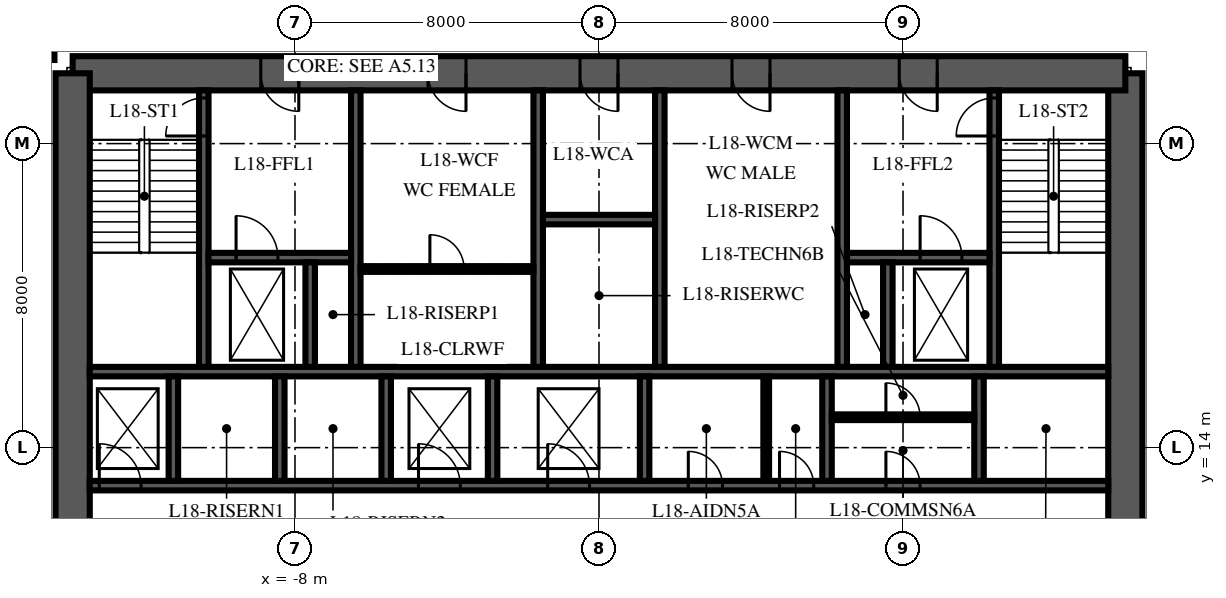
"""IFC4 building model, lengths in metres.
Left out: names, types, materials, properties, quantities, classifications, styles, units other than length and angle.
Written with IfcOpenShell. Run it as: python <this file> out.ifc"""

import sys

from ifc_helpers import new_model, si_unit, direction, frame, frame_2d, origin, place, context, subcontext, project, spatial, polyline, rectangle, outline, extrude, element, fill, save


model = new_model("IFC4")
c1 = context("Model", 3, precision=1e-05, world=origin(), true_north=direction((0.0, 1.0)))
c2 = subcontext(c1, "Body", "Model", "MODEL_VIEW")
j1 = project(units=[si_unit("LENGTHUNIT", "METRE"), si_unit("PLANEANGLEUNIT", "RADIAN")], contexts=[c1])
p1 = place(None, origin())
s1 = spatial("IfcSite", under=j1, at=p1, CompositionType="ELEMENT")
p2 = place(p1, origin())
s2 = spatial("IfcBuilding", under=s1, at=p2, CompositionType="ELEMENT")
p3 = place(p2, frame((0.0, 0.0, 84.0)))
s3 = spatial("IfcBuildingStorey", under=s2, at=p3, CompositionType="ELEMENT", Elevation=84.0)
p4 = place(p3, frame((13.85, 6.15, 0.0), z_axis=(0.0, 0.0, 1.0), x_axis=(0.0, 1.0, 0.0)))
e1 = element("IfcWall", 1, at=p4, inside=s3, PredefinedType="SHEAR", context=c2, shape_type="SweptSolid", body=[
    extrude(outline(polyline([(0.0, -0.45), (17.7, -0.45), (17.7, 0.0), (17.25, 0.0), (17.25, 0.45), (0.45, 0.45), (0.45, 0.0), (0.0, 0.0), (0.0, -0.45)])), origin(), (0.0, 0.0, 1.0), 4.0),
])
p5 = place(p4, frame((4.15, 0.0, 0.0)))
e2 = element("IfcOpeningElement", 2, at=p5, cuts=e1, PredefinedType="OPENING", context=c2, shape_type="SweptSolid", body=[
    extrude(rectangle(XDim=1.8, YDim=2.4, at=frame_2d((0.9, 1.2))), frame((0.0, 0.465, 0.0), z_axis=(0.0, -1.0, 0.0), x_axis=(1.0, 0.0, 0.0)), (0.0, 0.0, 1.0), 0.93),
])
p6 = place(p3, frame((13.85, 23.85, 0.0), z_axis=(0.0, 0.0, 1.0), x_axis=(-1.0, 0.0, 0.0)))
e3 = element("IfcWall", 3, at=p6, inside=s3, PredefinedType="SHEAR", context=c2, shape_type="SweptSolid", body=[
    extrude(rectangle(XDim=27.7, YDim=0.9, at=frame_2d((13.85, 0.0))), origin(), (0.0, 0.0, 1.0), 4.0),
])
p7 = place(p6, frame((21.75, 0.0, 0.0)))
e4 = element("IfcOpeningElement", 4, at=p7, cuts=e3, PredefinedType="OPENING", context=c2, shape_type="SweptSolid", body=[
    extrude(rectangle(XDim=1.0, YDim=2.1, at=frame_2d((0.5, 1.05))), frame((0.0, 0.465, 0.0), z_axis=(0.0, -1.0, 0.0), x_axis=(1.0, 0.0, 0.0)), (0.0, 0.0, 1.0), 0.93),
])
p8 = place(p6, frame((4.95, 0.0, 0.0)))
e5 = element("IfcOpeningElement", 5, at=p8, cuts=e3, PredefinedType="OPENING", context=c2, shape_type="SweptSolid", body=[
    extrude(rectangle(XDim=1.0, YDim=2.1, at=frame_2d((0.5, 1.05))), frame((0.0, 0.465, 0.0), z_axis=(0.0, -1.0, 0.0), x_axis=(1.0, 0.0, 0.0)), (0.0, 0.0, 1.0), 0.93),
])
p9 = place(p6, frame((17.35, 0.0, 0.0)))
e6 = element("IfcOpeningElement", 6, at=p9, cuts=e3, PredefinedType="OPENING", context=c2, shape_type="SweptSolid", body=[
    extrude(rectangle(XDim=1.0, YDim=2.1, at=frame_2d((0.5, 1.05))), frame((0.0, 0.465, 0.0), z_axis=(0.0, -1.0, 0.0), x_axis=(1.0, 0.0, 0.0)), (0.0, 0.0, 1.0), 0.93),
])
p10 = place(p6, frame((13.35, 0.0, 0.0)))
e7 = element("IfcOpeningElement", 7, at=p10, cuts=e3, PredefinedType="OPENING", context=c2, shape_type="SweptSolid", body=[
    extrude(rectangle(XDim=1.0, YDim=2.1, at=frame_2d((0.5, 1.05))), frame((0.0, 0.465, 0.0), z_axis=(0.0, -1.0, 0.0), x_axis=(1.0, 0.0, 0.0)), (0.0, 0.0, 1.0), 0.93),
])
p11 = place(p6, frame((9.35, 0.0, 0.0)))
e8 = element("IfcOpeningElement", 8, at=p11, cuts=e3, PredefinedType="OPENING", context=c2, shape_type="SweptSolid", body=[
    extrude(rectangle(XDim=1.0, YDim=2.1, at=frame_2d((0.5, 1.05))), frame((0.0, 0.465, 0.0), z_axis=(0.0, -1.0, 0.0), x_axis=(1.0, 0.0, 0.0)), (0.0, 0.0, 1.0), 0.93),
])
p12 = place(p3, frame((-13.85, 23.85, 0.0), z_axis=(0.0, 0.0, 1.0), x_axis=(0.0, -1.0, 0.0)))
e9 = element("IfcWall", 9, at=p12, inside=s3, PredefinedType="SHEAR", context=c2, shape_type="SweptSolid", body=[
    extrude(outline(polyline([(0.0, -0.45), (17.7, -0.45), (17.7, 0.0), (17.25, 0.0), (17.25, 0.45), (0.45, 0.45), (0.45, 0.0), (0.0, 0.0), (0.0, -0.45)])), origin(), (0.0, 0.0, 1.0), 4.0),
])
p13 = place(p12, frame((11.75, 0.0, 0.0)))
e10 = element("IfcOpeningElement", 10, at=p13, cuts=e9, PredefinedType="OPENING", context=c2, shape_type="SweptSolid", body=[
    extrude(rectangle(XDim=1.8, YDim=2.4, at=frame_2d((0.9, 1.2))), frame((0.0, 0.465, 0.0), z_axis=(0.0, -1.0, 0.0), x_axis=(1.0, 0.0, 0.0)), (0.0, 0.0, 1.0), 0.93),
])
p14 = place(p3, frame((-13.4, 13.0, 0.0), z_axis=(0.0, 0.0, 1.0), x_axis=(1.0, 0.0, 0.0)))
e11 = element("IfcWall", 11, at=p14, inside=s3, PredefinedType="SHEAR", context=c2, shape_type="SweptSolid", body=[
    extrude(rectangle(XDim=26.8, YDim=0.25, at=frame_2d((13.4, 0.0))), origin(), (0.0, 0.0, 1.0), 4.0),
])
p15 = place(p14, frame((0.25, 0.0, 0.0)))
e12 = element("IfcOpeningElement", 12, at=p15, cuts=e11, PredefinedType="OPENING", context=c2, shape_type="SweptSolid", body=[
    extrude(rectangle(XDim=1.1, YDim=2.1, at=frame_2d((0.55, 1.05))), frame((0.0, 0.14, 0.0), z_axis=(0.0, -1.0, 0.0), x_axis=(1.0, 0.0, 0.0)), (0.0, 0.0, 1.0), 0.28),
])
p16 = place(p14, frame((8.65, 0.0, 0.0)))
e13 = element("IfcOpeningElement", 13, at=p16, cuts=e11, PredefinedType="OPENING", context=c2, shape_type="SweptSolid", body=[
    extrude(rectangle(XDim=1.1, YDim=2.1, at=frame_2d((0.55, 1.05))), frame((0.0, 0.14, 0.0), z_axis=(0.0, -1.0, 0.0), x_axis=(1.0, 0.0, 0.0)), (0.0, 0.0, 1.0), 0.28),
])
p17 = place(p14, frame((12.05, 0.0, 0.0)))
e14 = element("IfcOpeningElement", 14, at=p17, cuts=e11, PredefinedType="OPENING", context=c2, shape_type="SweptSolid", body=[
    extrude(rectangle(XDim=1.1, YDim=2.1, at=frame_2d((0.55, 1.05))), frame((0.0, 0.14, 0.0), z_axis=(0.0, -1.0, 0.0), x_axis=(1.0, 0.0, 0.0)), (0.0, 0.0, 1.0), 0.28),
])
p18 = place(p14, frame((15.75, 0.0, 0.0)))
e15 = element("IfcOpeningElement", 15, at=p18, cuts=e11, PredefinedType="OPENING", context=c2, shape_type="SweptSolid", body=[
    extrude(rectangle(XDim=0.9, YDim=2.1, at=frame_2d((0.45, 1.05))), frame((0.0, 0.14, 0.0), z_axis=(0.0, -1.0, 0.0), x_axis=(1.0, 0.0, 0.0)), (0.0, 0.0, 1.0), 0.28),
])
p19 = place(p14, frame((18.15, 0.0, 0.0)))
e16 = element("IfcOpeningElement", 16, at=p19, cuts=e11, PredefinedType="OPENING", context=c2, shape_type="SweptSolid", body=[
    extrude(rectangle(XDim=0.9, YDim=2.1, at=frame_2d((0.45, 1.05))), frame((0.0, 0.14, 0.0), z_axis=(0.0, -1.0, 0.0), x_axis=(1.0, 0.0, 0.0)), (0.0, 0.0, 1.0), 0.28),
])
p20 = place(p14, frame((20.95, 0.0, 0.0)))
e17 = element("IfcOpeningElement", 17, at=p20, cuts=e11, PredefinedType="OPENING", context=c2, shape_type="SweptSolid", body=[
    extrude(rectangle(XDim=0.9, YDim=2.1, at=frame_2d((0.45, 1.05))), frame((0.0, 0.14, 0.0), z_axis=(0.0, -1.0, 0.0), x_axis=(1.0, 0.0, 0.0)), (0.0, 0.0, 1.0), 0.28),
])
p21 = place(p3, frame((-13.4, 16.0, 0.0), z_axis=(0.0, 0.0, 1.0), x_axis=(1.0, 0.0, 0.0)))
e18 = element("IfcWall", 18, at=p21, inside=s3, PredefinedType="SHEAR", context=c2, shape_type="SweptSolid", body=[
    extrude(rectangle(XDim=26.8, YDim=0.25, at=frame_2d((13.4, 0.0))), origin(), (0.0, 0.0, 1.0), 4.0),
])
for number, where, z_axis, x_axis in (
    (19, (-11.2, 13.125, 0.0), (0.0, 0.0, 1.0), (0.0, 1.0, 0.0)),
    (20, (-8.4, 13.125, 0.0), (0.0, 0.0, 1.0), (0.0, 1.0, 0.0)),
    (21, (-5.6, 13.125, 0.0), (0.0, 0.0, 1.0), (0.0, 1.0, 0.0)),
    (22, (-2.8, 13.125, 0.0), (0.0, 0.0, 1.0), (0.0, 1.0, 0.0)),
    (23, (1.2, 13.125, 0.0), (0.0, 0.0, 1.0), (0.0, 1.0, 0.0)),
    (24, (6.0, 13.125, 0.0), (0.0, 0.0, 1.0), (0.0, 1.0, 0.0)),
    (25, (10.0, 13.125, 0.0), (0.0, 0.0, 1.0), (0.0, 1.0, 0.0)),
):
    element("IfcWall", number, at=place(p3, frame(where, z_axis=z_axis, x_axis=x_axis)), inside=s3, PredefinedType="SHEAR", context=c2, shape_type="SweptSolid", body=[
        extrude(rectangle(XDim=2.75, YDim=0.25, at=frame_2d((1.375, 0.0))), origin(), (0.0, 0.0, 1.0), 4.0),
    ])
p22 = place(p3, frame((-10.4, 16.125, 0.0), z_axis=(0.0, 0.0, 1.0), x_axis=(0.0, 1.0, 0.0)))
e26 = element("IfcWall", 26, at=p22, inside=s3, PredefinedType="SHEAR", context=c2, shape_type="SweptSolid", body=[
    extrude(rectangle(XDim=7.275, YDim=0.25, at=frame_2d((3.637, 0.0))), origin(), (0.0, 0.0, 1.0), 4.0),
])
p23 = place(p22, frame((6.075, 0.0, 0.0)))
e27 = element("IfcOpeningElement", 27, at=p23, cuts=e26, PredefinedType="OPENING", context=c2, shape_type="SweptSolid", body=[
    extrude(rectangle(XDim=1.0, YDim=2.1, at=frame_2d((0.5, 1.05))), frame((0.0, 0.14, 0.0), z_axis=(0.0, -1.0, 0.0), x_axis=(1.0, 0.0, 0.0)), (0.0, 0.0, 1.0), 0.28),
])
for number, where, z_axis, x_axis in (
    (28, (-6.4, 16.125, 0.0), (0.0, 0.0, 1.0), (0.0, 1.0, 0.0)),
    (29, (-1.6, 16.125, 0.0), (0.0, 0.0, 1.0), (0.0, 1.0, 0.0)),
    (30, (1.6, 16.125, 0.0), (0.0, 0.0, 1.0), (0.0, 1.0, 0.0)),
    (31, (6.4, 16.125, 0.0), (0.0, 0.0, 1.0), (0.0, 1.0, 0.0)),
):
    element("IfcWall", number, at=place(p3, frame(where, z_axis=z_axis, x_axis=x_axis)), inside=s3, PredefinedType="SHEAR", context=c2, shape_type="SweptSolid", body=[
        extrude(rectangle(XDim=7.275, YDim=0.25, at=frame_2d((3.637, 0.0))), origin(), (0.0, 0.0, 1.0), 4.0),
    ])
p24 = place(p3, frame((10.4, 16.125, 0.0), z_axis=(0.0, 0.0, 1.0), x_axis=(0.0, 1.0, 0.0)))
e32 = element("IfcWall", 32, at=p24, inside=s3, PredefinedType="SHEAR", context=c2, shape_type="SweptSolid", body=[
    extrude(rectangle(XDim=7.275, YDim=0.25, at=frame_2d((3.637, 0.0))), origin(), (0.0, 0.0, 1.0), 4.0),
])
p25 = place(p24, frame((6.075, 0.0, 0.0)))
e33 = element("IfcOpeningElement", 33, at=p25, cuts=e32, PredefinedType="OPENING", context=c2, shape_type="SweptSolid", body=[
    extrude(rectangle(XDim=1.0, YDim=2.1, at=frame_2d((0.5, 1.05))), frame((0.0, 0.14, 0.0), z_axis=(0.0, -1.0, 0.0), x_axis=(1.0, 0.0, 0.0)), (0.0, 0.0, 1.0), 0.28),
])
p26 = place(p3, frame((-10.275, 19.0, 0.0), z_axis=(0.0, 0.0, 1.0), x_axis=(1.0, 0.0, 0.0)))
e34 = element("IfcWall", 34, at=p26, inside=s3, PredefinedType="SHEAR", context=c2, shape_type="SweptSolid", body=[
    extrude(rectangle(XDim=3.75, YDim=0.25, at=frame_2d((1.875, 0.0))), origin(), (0.0, 0.0, 1.0), 4.0),
])
p27 = place(p26, frame((0.725, 0.0, 0.0)))
e35 = element("IfcOpeningElement", 35, at=p27, cuts=e34, PredefinedType="OPENING", context=c2, shape_type="SweptSolid", body=[
    extrude(rectangle(XDim=1.1, YDim=2.1, at=frame_2d((0.55, 1.05))), frame((0.0, 0.14, 0.0), z_axis=(0.0, -1.0, 0.0), x_axis=(1.0, 0.0, 0.0)), (0.0, 0.0, 1.0), 0.28),
])
p28 = place(p3, frame((6.525, 19.0, 0.0), z_axis=(0.0, 0.0, 1.0), x_axis=(1.0, 0.0, 0.0)))
e36 = element("IfcWall", 36, at=p28, inside=s3, PredefinedType="SHEAR", context=c2, shape_type="SweptSolid", body=[
    extrude(rectangle(XDim=3.75, YDim=0.25, at=frame_2d((1.875, 0.0))), origin(), (0.0, 0.0, 1.0), 4.0),
])
p29 = place(p28, frame((1.925, 0.0, 0.0)))
e37 = element("IfcOpeningElement", 37, at=p29, cuts=e36, PredefinedType="OPENING", context=c2, shape_type="SweptSolid", body=[
    extrude(rectangle(XDim=1.1, YDim=2.1, at=frame_2d((0.55, 1.05))), frame((0.0, 0.14, 0.0), z_axis=(0.0, -1.0, 0.0), x_axis=(1.0, 0.0, 0.0)), (0.0, 0.0, 1.0), 0.28),
])
for number, where, z_axis, x_axis in (
    (38, (-7.6, 16.125, 0.0), (0.0, 0.0, 1.0), (0.0, 1.0, 0.0)),
    (39, (7.6, 16.125, 0.0), (0.0, 0.0, 1.0), (0.0, 1.0, 0.0)),
):
    element("IfcWall", number, at=place(p3, frame(where, z_axis=z_axis, x_axis=x_axis)), inside=s3, PredefinedType="SHEAR", context=c2, shape_type="SweptSolid", body=[
        extrude(rectangle(XDim=2.75, YDim=0.25, at=frame_2d((1.375, 0.0))), origin(), (0.0, 0.0, 1.0), 4.0),
    ])
p30 = place(p3, frame((-1.475, 20.0, 0.0), z_axis=(0.0, 0.0, 1.0), x_axis=(1.0, 0.0, 0.0)))
e40 = element("IfcWall", 40, at=p30, inside=s3, PredefinedType="SHEAR", context=c2, shape_type="SweptSolid", body=[
    extrude(rectangle(XDim=2.95, YDim=0.25, at=frame_2d((1.475, 0.0))), origin(), (0.0, 0.0, 1.0), 4.0),
])
p31 = place(p3, frame((-6.275, 18.7, 0.0), z_axis=(0.0, 0.0, 1.0), x_axis=(1.0, 0.0, 0.0)))
e41 = element("IfcWall", 41, at=p31, inside=s3, PredefinedType="PARTITIONING", context=c2, shape_type="SweptSolid", body=[
    extrude(rectangle(XDim=4.55, YDim=0.15, at=frame_2d((2.275, 0.0))), origin(), (0.0, 0.0, 1.0), 3.85),
])
p32 = place(p31, frame((1.825, 0.0, 0.0)))
e42 = element("IfcOpeningElement", 42, at=p32, cuts=e41, PredefinedType="OPENING", context=c2, shape_type="SweptSolid", body=[
    extrude(rectangle(XDim=0.9, YDim=2.1, at=frame_2d((0.45, 1.05))), frame((0.0, 0.09, 0.0), z_axis=(0.0, -1.0, 0.0), x_axis=(1.0, 0.0, 0.0)), (0.0, 0.0, 1.0), 0.18),
])
p33 = place(p3, frame((4.4, 13.125, 0.0), z_axis=(0.0, 0.0, 1.0), x_axis=(0.0, 1.0, 0.0)))
e43 = element("IfcWall", 43, at=p33, inside=s3, PredefinedType="PARTITIONING", context=c2, shape_type="SweptSolid", body=[
    extrude(rectangle(XDim=2.75, YDim=0.15, at=frame_2d((1.375, 0.0))), origin(), (0.0, 0.0, 1.0), 3.85),
])
p34 = place(p3, frame((6.125, 14.8, 0.0), z_axis=(0.0, 0.0, 1.0), x_axis=(1.0, 0.0, 0.0)))
e44 = element("IfcWall", 44, at=p34, inside=s3, PredefinedType="PARTITIONING", context=c2, shape_type="SweptSolid", body=[
    extrude(rectangle(XDim=3.75, YDim=0.15, at=frame_2d((1.875, 0.0))), origin(), (0.0, 0.0, 1.0), 3.85),
])
p35 = place(p34, frame((1.425, 0.0, 0.0)))
e45 = element("IfcOpeningElement", 45, at=p35, cuts=e44, PredefinedType="OPENING", context=c2, shape_type="SweptSolid", body=[
    extrude(rectangle(XDim=0.9, YDim=2.1, at=frame_2d((0.45, 1.05))), frame((0.0, 0.09, 0.0), z_axis=(0.0, -1.0, 0.0), x_axis=(1.0, 0.0, 0.0)), (0.0, 0.0, 1.0), 0.18),
])
p36 = place(p3, frame((-16.1, 24.3, 0.0), z_axis=(0.0, 0.0, 1.0), x_axis=(1.0, 0.0, 0.0)))
e46 = element("IfcWall", 46, at=p36, inside=s3, PredefinedType="PARTITIONING", context=c2, shape_type="SweptSolid", body=[
    extrude(rectangle(XDim=1.77, YDim=0.2, at=frame_2d((0.885, 0.0))), origin(), (0.0, 0.0, 1.0), 3.4),
])
p37 = place(p7, origin())
e47 = element("IfcDoor", 47, at=p37, inside=s3, OperationType="SINGLE_SWING_RIGHT", PredefinedType="DOOR", context=c2, shape_type="SweptSolid", body=[
    extrude(rectangle(XDim=1.0, YDim=2.1, at=frame_2d((0.5, 1.05))), frame((0.0, 0.45, 0.0), z_axis=(0.0, -1.0, 0.0), x_axis=(1.0, 0.0, 0.0)), (0.0, 0.0, 1.0), 0.899),
])
fill(e4, e47)
p38 = place(p8, origin())
e48 = element("IfcDoor", 48, at=p38, inside=s3, OperationType="SINGLE_SWING_RIGHT", PredefinedType="DOOR", context=c2, shape_type="SweptSolid", body=[
    extrude(rectangle(XDim=1.0, YDim=2.1, at=frame_2d((0.5, 1.05))), frame((0.0, 0.45, 0.0), z_axis=(0.0, -1.0, 0.0), x_axis=(1.0, 0.0, 0.0)), (0.0, 0.0, 1.0), 0.899),
])
fill(e5, e48)
p39 = place(p9, origin())
e49 = element("IfcDoor", 49, at=p39, inside=s3, OperationType="SINGLE_SWING_LEFT", PredefinedType="DOOR", context=c2, shape_type="SweptSolid", body=[
    extrude(rectangle(XDim=1.0, YDim=2.1, at=frame_2d((0.5, 1.05))), frame((0.0, 0.45, 0.0), z_axis=(0.0, -1.0, 0.0), x_axis=(1.0, 0.0, 0.0)), (0.0, 0.0, 1.0), 0.899),
])
fill(e6, e49)
p40 = place(p10, origin())
e50 = element("IfcDoor", 50, at=p40, inside=s3, OperationType="SINGLE_SWING_LEFT", PredefinedType="DOOR", context=c2, shape_type="SweptSolid", body=[
    extrude(rectangle(XDim=1.0, YDim=2.1, at=frame_2d((0.5, 1.05))), frame((0.0, 0.45, 0.0), z_axis=(0.0, -1.0, 0.0), x_axis=(1.0, 0.0, 0.0)), (0.0, 0.0, 1.0), 0.899),
])
fill(e7, e50)
p41 = place(p11, origin())
e51 = element("IfcDoor", 51, at=p41, inside=s3, OperationType="SINGLE_SWING_LEFT", PredefinedType="DOOR", context=c2, shape_type="SweptSolid", body=[
    extrude(rectangle(XDim=1.0, YDim=2.1, at=frame_2d((0.5, 1.05))), frame((0.0, 0.45, 0.0), z_axis=(0.0, -1.0, 0.0), x_axis=(1.0, 0.0, 0.0)), (0.0, 0.0, 1.0), 0.899),
])
fill(e8, e51)
p42 = place(p23, origin())
e52 = element("IfcDoor", 52, at=p42, inside=s3, OperationType="SINGLE_SWING_LEFT", PredefinedType="DOOR", context=c2, shape_type="SweptSolid", body=[
    extrude(rectangle(XDim=1.0, YDim=2.1, at=frame_2d((0.5, 1.05))), frame((0.0, 0.125, 0.0), z_axis=(0.0, -1.0, 0.0), x_axis=(1.0, 0.0, 0.0)), (0.0, 0.0, 1.0), 0.25),
])
fill(e27, e52)
p43 = place(p25, origin())
e53 = element("IfcDoor", 53, at=p43, inside=s3, OperationType="SINGLE_SWING_LEFT", PredefinedType="DOOR", context=c2, shape_type="SweptSolid", body=[
    extrude(rectangle(XDim=1.0, YDim=2.1, at=frame_2d((0.5, 1.05))), frame((0.0, 0.125, 0.0), z_axis=(0.0, -1.0, 0.0), x_axis=(1.0, 0.0, 0.0)), (0.0, 0.0, 1.0), 0.25),
])
fill(e33, e53)
p44 = place(p15, origin())
e54 = element("IfcDoor", 54, at=p44, inside=s3, OperationType="SLIDING_TO_LEFT", PredefinedType="DOOR", context=c2, shape_type="SweptSolid", body=[
    extrude(rectangle(XDim=1.1, YDim=2.1, at=frame_2d((0.55, 1.05))), frame((0.0, 0.125, 0.0), z_axis=(0.0, -1.0, 0.0), x_axis=(1.0, 0.0, 0.0)), (0.0, 0.0, 1.0), 0.25),
])
fill(e12, e54)
p45 = place(p16, origin())
e55 = element("IfcDoor", 55, at=p45, inside=s3, OperationType="SLIDING_TO_LEFT", PredefinedType="DOOR", context=c2, shape_type="SweptSolid", body=[
    extrude(rectangle(XDim=1.1, YDim=2.1, at=frame_2d((0.55, 1.05))), frame((0.0, 0.125, 0.0), z_axis=(0.0, -1.0, 0.0), x_axis=(1.0, 0.0, 0.0)), (0.0, 0.0, 1.0), 0.25),
])
fill(e13, e55)
p46 = place(p17, origin())
e56 = element("IfcDoor", 56, at=p46, inside=s3, OperationType="SLIDING_TO_LEFT", PredefinedType="DOOR", context=c2, shape_type="SweptSolid", body=[
    extrude(rectangle(XDim=1.1, YDim=2.1, at=frame_2d((0.55, 1.05))), frame((0.0, 0.125, 0.0), z_axis=(0.0, -1.0, 0.0), x_axis=(1.0, 0.0, 0.0)), (0.0, 0.0, 1.0), 0.25),
])
fill(e14, e56)
p47 = place(p29, origin())
e57 = element("IfcDoor", 57, at=p47, inside=s3, OperationType="SLIDING_TO_RIGHT", PredefinedType="DOOR", context=c2, shape_type="SweptSolid", body=[
    extrude(rectangle(XDim=1.1, YDim=2.1, at=frame_2d((0.55, 1.05))), frame((0.0, 0.125, 0.0), z_axis=(0.0, -1.0, 0.0), x_axis=(1.0, 0.0, 0.0)), (0.0, 0.0, 1.0), 0.25),
])
fill(e37, e57)
p48 = place(p27, origin())
e58 = element("IfcDoor", 58, at=p48, inside=s3, OperationType="SLIDING_TO_RIGHT", PredefinedType="DOOR", context=c2, shape_type="SweptSolid", body=[
    extrude(rectangle(XDim=1.1, YDim=2.1, at=frame_2d((0.55, 1.05))), frame((0.0, 0.125, 0.0), z_axis=(0.0, -1.0, 0.0), x_axis=(1.0, 0.0, 0.0)), (0.0, 0.0, 1.0), 0.25),
])
fill(e35, e58)
p49 = place(p18, origin())
e59 = element("IfcDoor", 59, at=p49, inside=s3, OperationType="SINGLE_SWING_LEFT", PredefinedType="DOOR", context=c2, shape_type="SweptSolid", body=[
    extrude(rectangle(XDim=0.9, YDim=2.1, at=frame_2d((0.45, 1.05))), frame((0.0, 0.125, 0.0), z_axis=(0.0, -1.0, 0.0), x_axis=(1.0, 0.0, 0.0)), (0.0, 0.0, 1.0), 0.25),
])
fill(e15, e59)
p50 = place(p19, origin())
e60 = element("IfcDoor", 60, at=p50, inside=s3, OperationType="SINGLE_SWING_LEFT", PredefinedType="DOOR", context=c2, shape_type="SweptSolid", body=[
    extrude(rectangle(XDim=0.9, YDim=2.1, at=frame_2d((0.45, 1.05))), frame((0.0, 0.125, 0.0), z_axis=(0.0, -1.0, 0.0), x_axis=(1.0, 0.0, 0.0)), (0.0, 0.0, 1.0), 0.25),
])
fill(e16, e60)
p51 = place(p20, origin())
e61 = element("IfcDoor", 61, at=p51, inside=s3, OperationType="SINGLE_SWING_LEFT", PredefinedType="DOOR", context=c2, shape_type="SweptSolid", body=[
    extrude(rectangle(XDim=0.9, YDim=2.1, at=frame_2d((0.45, 1.05))), frame((0.0, 0.125, 0.0), z_axis=(0.0, -1.0, 0.0), x_axis=(1.0, 0.0, 0.0)), (0.0, 0.0, 1.0), 0.25),
])
fill(e17, e61)
p52 = place(p35, origin())
e62 = element("IfcDoor", 62, at=p52, inside=s3, OperationType="SINGLE_SWING_LEFT", PredefinedType="DOOR", context=c2, shape_type="SweptSolid", body=[
    extrude(rectangle(XDim=0.9, YDim=2.1, at=frame_2d((0.45, 1.05))), frame((0.0, 0.075, 0.0), z_axis=(0.0, -1.0, 0.0), x_axis=(1.0, 0.0, 0.0)), (0.0, 0.0, 1.0), 0.149),
])
fill(e45, e62)
p53 = place(p32, origin())
e63 = element("IfcDoor", 63, at=p53, inside=s3, OperationType="SINGLE_SWING_LEFT", PredefinedType="DOOR", context=c2, shape_type="SweptSolid", body=[
    extrude(rectangle(XDim=0.9, YDim=2.1, at=frame_2d((0.45, 1.05))), frame((0.0, 0.075, 0.0), z_axis=(0.0, -1.0, 0.0), x_axis=(1.0, 0.0, 0.0)), (0.0, 0.0, 1.0), 0.149),
])
fill(e42, e63)
save(model, sys.argv[1])
